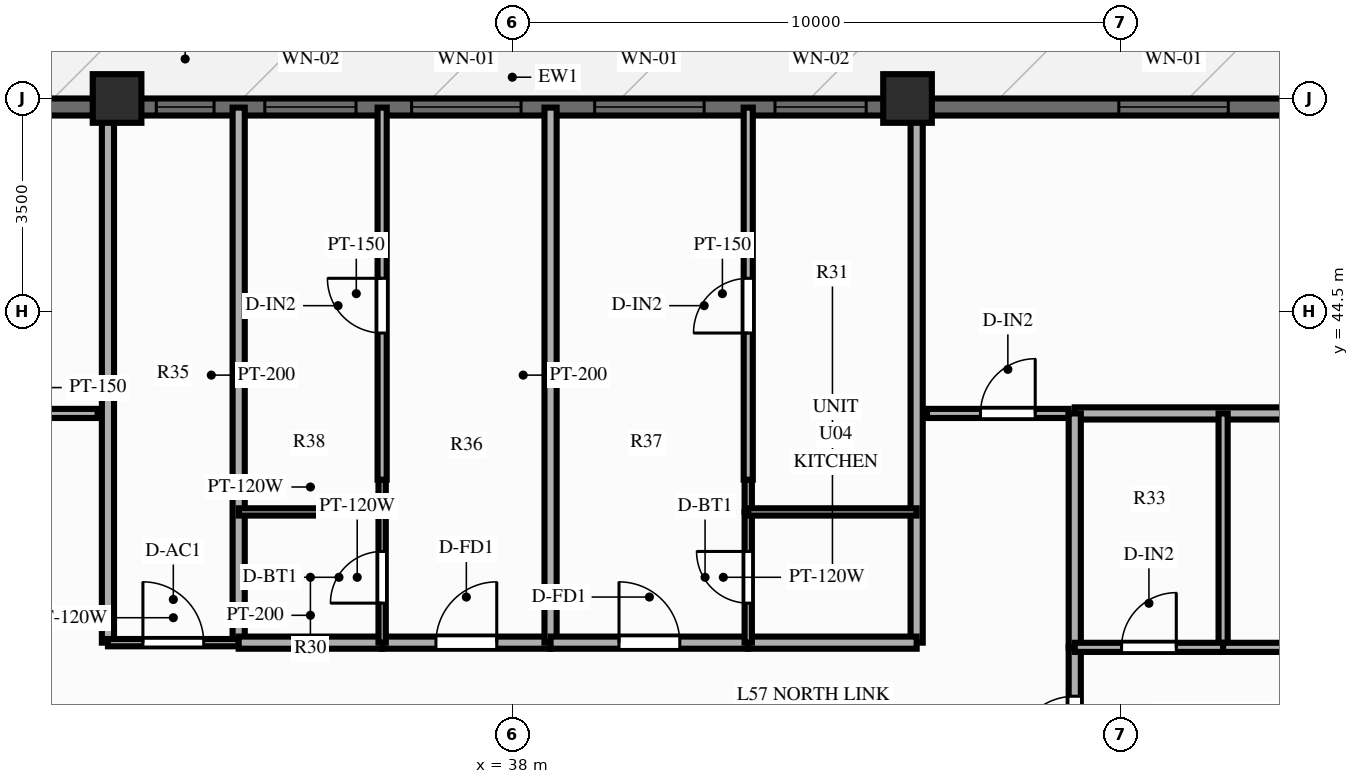
"""IFC4 building model, lengths in metres.
Left out: names, types, materials, properties, quantities, classifications, styles, units other than length and angle.
Written with IfcOpenShell. Run it as: python <this file> out.ifc"""

import sys

from ifc_helpers import new_model, si_unit, direction, frame, frame_2d, origin, origin_2d, place, context, subcontext, project, spatial, rectangle, extrude, source, transform, mapped, element, fill, save


model = new_model("IFC4")
c1 = context("Model", 3, precision=1e-05, world=origin(), true_north=direction((0.0, 1.0)))
c2 = subcontext(c1, "Body", "Model", "MODEL_VIEW")
j1 = project(units=[si_unit("LENGTHUNIT", "METRE"), si_unit("PLANEANGLEUNIT", "RADIAN")], contexts=[c1])
p1 = place(None, origin())
s1 = spatial("IfcSite", under=j1, at=p1, CompositionType="ELEMENT")
p2 = place(p1, origin())
s2 = spatial("IfcBuilding", under=s1, at=p2, CompositionType="ELEMENT")
p3 = place(p2, frame((0.0, 0.0, 182.8)))
s3 = spatial("IfcBuildingStorey", under=s2, at=p3, CompositionType="ELEMENT", Elevation=182.8)
m1 = source(origin(), c2, "Body", "SweptSolid", [
    extrude(rectangle(XDim=0.8, YDim=0.8, at=origin_2d()), origin(), (0.0, 0.0, 1.0), 3.9),
])
for number, where, z_axis, x_axis in (
    (1, (44.5, 48.0, 0.0), (0.0, 0.0, 1.0), (1.0, 0.0, 0.0)),
    (2, (31.5, 48.0, 0.0), (0.0, 0.0, 1.0), (1.0, 0.0, 0.0)),
):
    element("IfcColumn", number, at=place(p3, frame(where, z_axis=z_axis, x_axis=x_axis)), inside=s3, PredefinedType="COLUMN", context=c2, shape_type="MappedRepresentation", body=[
        mapped(m1, transform((0.0, 0.0, 0.0), scale=1.0)),
    ])
p4 = place(p3, frame((22.75, 47.86, 0.0), z_axis=(0.0, 0.0, 1.0), x_axis=(1.0, 0.0, 0.0)))
e3 = element("IfcWall", 3, at=p4, inside=s3, PredefinedType="SOLIDWALL", context=c2, shape_type="SweptSolid", body=[
    extrude(rectangle(XDim=30.5, YDim=0.28, at=frame_2d((15.25, 0.0))), origin(), (0.0, 0.0, 1.0), 2.79),
])
p5 = place(p4, frame((3.825, 0.0, 0.0)))
e4 = element("IfcOpeningElement", 4, at=p5, cuts=e3, PredefinedType="OPENING", context=c2, shape_type="SweptSolid", body=[
    extrude(rectangle(XDim=1.1, YDim=2.15, at=frame_2d((0.55, 1.075))), frame((0.0, 0.152, 0.0), z_axis=(0.0, -1.0, 0.0), x_axis=(1.0, 0.0, 0.0)), (0.0, 0.0, 1.0), 0.304),
])
p6 = place(p4, frame((9.395, 0.0, 0.85)))
e5 = element("IfcOpeningElement", 5, at=p6, cuts=e3, PredefinedType="OPENING", context=c2, shape_type="SweptSolid", body=[
    extrude(rectangle(XDim=0.95, YDim=1.5, at=frame_2d((0.475, 0.75))), frame((0.0, 0.152, 0.0), z_axis=(0.0, -1.0, 0.0), x_axis=(1.0, 0.0, 0.0)), (0.0, 0.0, 1.0), 0.304),
])
p7 = place(p4, frame((11.18, 0.0, 0.85)))
e6 = element("IfcOpeningElement", 6, at=p7, cuts=e3, PredefinedType="OPENING", context=c2, shape_type="SweptSolid", body=[
    extrude(rectangle(XDim=1.5, YDim=1.65, at=frame_2d((0.75, 0.825))), frame((0.0, 0.152, 0.0), z_axis=(0.0, -1.0, 0.0), x_axis=(1.0, 0.0, 0.0)), (0.0, 0.0, 1.0), 0.304),
])
p8 = place(p4, frame((13.594, 0.0, 0.85)))
e7 = element("IfcOpeningElement", 7, at=p8, cuts=e3, PredefinedType="OPENING", context=c2, shape_type="SweptSolid", body=[
    extrude(rectangle(XDim=1.8, YDim=1.65, at=frame_2d((0.9, 0.825))), frame((0.0, 0.152, 0.0), z_axis=(0.0, -1.0, 0.0), x_axis=(1.0, 0.0, 0.0)), (0.0, 0.0, 1.0), 0.304),
])
p9 = place(p4, frame((16.604, 0.0, 0.85)))
e8 = element("IfcOpeningElement", 8, at=p9, cuts=e3, PredefinedType="OPENING", context=c2, shape_type="SweptSolid", body=[
    extrude(rectangle(XDim=1.8, YDim=1.65, at=frame_2d((0.9, 0.825))), frame((0.0, 0.152, 0.0), z_axis=(0.0, -1.0, 0.0), x_axis=(1.0, 0.0, 0.0)), (0.0, 0.0, 1.0), 0.304),
])
p10 = place(p4, frame((19.57, 0.0, 0.85)))
e9 = element("IfcOpeningElement", 9, at=p10, cuts=e3, PredefinedType="OPENING", context=c2, shape_type="SweptSolid", body=[
    extrude(rectangle(XDim=1.5, YDim=1.65, at=frame_2d((0.75, 0.825))), frame((0.0, 0.152, 0.0), z_axis=(0.0, -1.0, 0.0), x_axis=(1.0, 0.0, 0.0)), (0.0, 0.0, 1.0), 0.304),
])
p11 = place(p4, frame((25.225, 0.0, 0.85)))
e10 = element("IfcOpeningElement", 10, at=p11, cuts=e3, PredefinedType="OPENING", context=c2, shape_type="SweptSolid", body=[
    extrude(rectangle(XDim=1.8, YDim=1.65, at=frame_2d((0.9, 0.825))), frame((0.0, 0.152, 0.0), z_axis=(0.0, -1.0, 0.0), x_axis=(1.0, 0.0, 0.0)), (0.0, 0.0, 1.0), 0.304),
])
p12 = place(p3, frame((28.85, 42.82, 0.0), z_axis=(0.0, 0.0, 1.0), x_axis=(1.0, 0.0, 0.0)))
e11 = element("IfcWall", 11, at=p12, inside=s3, PredefinedType="PARTITIONING", context=c2, shape_type="SweptSolid", body=[
    extrude(rectangle(XDim=2.33, YDim=0.15, at=frame_2d((1.165, 0.0))), origin(), (0.0, 0.0, 1.0), 3.69),
])
p13 = place(p12, frame((0.55, 0.0, 0.0)))
e12 = element("IfcOpeningElement", 12, at=p13, cuts=e11, PredefinedType="OPENING", context=c2, shape_type="SweptSolid", body=[
    extrude(rectangle(XDim=0.9, YDim=2.1, at=frame_2d((0.45, 1.05))), frame((0.0, 0.087, 0.0), z_axis=(0.0, -1.0, 0.0), x_axis=(1.0, 0.0, 0.0)), (0.0, 0.0, 1.0), 0.174),
])
p14 = place(p3, frame((44.82, 42.82, 0.0), z_axis=(0.0, 0.0, 1.0), x_axis=(1.0, 0.0, 0.0)))
e13 = element("IfcWall", 13, at=p14, inside=s3, PredefinedType="PARTITIONING", context=c2, shape_type="SweptSolid", body=[
    extrude(rectangle(XDim=2.33, YDim=0.15, at=frame_2d((1.165, 0.0))), origin(), (0.0, 0.0, 1.0), 3.69),
])
p15 = place(p14, frame((0.88, 0.0, 0.0)))
e14 = element("IfcOpeningElement", 14, at=p15, cuts=e13, PredefinedType="OPENING", context=c2, shape_type="SweptSolid", body=[
    extrude(rectangle(XDim=0.9, YDim=2.1, at=frame_2d((0.45, 1.05))), frame((0.0, 0.087, 0.0), z_axis=(0.0, -1.0, 0.0), x_axis=(1.0, 0.0, 0.0)), (0.0, 0.0, 1.0), 0.174),
])
for number, where, z_axis, x_axis in (
    (15, (31.35, 39.05, 0.0), (0.0, 0.0, 1.0), (0.0, 1.0, 0.0)),
    (16, (44.65, 39.05, 0.0), (0.0, 0.0, 1.0), (0.0, 1.0, 0.0)),
):
    element("IfcWall", number, at=place(p3, frame(where, z_axis=z_axis, x_axis=x_axis)), inside=s3, PredefinedType="PARTITIONING", context=c2, shape_type="SweptSolid", body=[
        extrude(rectangle(XDim=8.8, YDim=0.2, at=frame_2d((4.4, 0.0))), origin(), (0.0, 0.0, 1.0), 2.79),
    ])
p16 = place(p3, frame((33.5, 39.05, 0.0), z_axis=(0.0, 0.0, 1.0), x_axis=(0.0, 1.0, 0.0)))
e17 = element("IfcWall", 17, at=p16, inside=s3, PredefinedType="PARTITIONING", context=c2, shape_type="SweptSolid", body=[
    extrude(rectangle(XDim=8.8, YDim=0.2, at=frame_2d((4.4, 0.0))), origin(), (0.0, 0.0, 1.0), 3.69),
])
p17 = place(p3, frame((31.35, 39.05, 0.0), z_axis=(0.0, 0.0, 1.0), x_axis=(1.0, 0.0, 0.0)))
e18 = element("IfcWall", 18, at=p17, inside=s3, PredefinedType="PARTITIONING", context=c2, shape_type="SweptSolid", body=[
    extrude(rectangle(XDim=2.15, YDim=0.12, at=frame_2d((1.075, 0.0))), origin(), (0.0, 0.0, 1.0), 3.69),
])
p18 = place(p17, frame((0.575, 0.0, 0.0)))
e19 = element("IfcOpeningElement", 19, at=p18, cuts=e18, PredefinedType="OPENING", context=c2, shape_type="SweptSolid", body=[
    extrude(rectangle(XDim=1.0, YDim=2.1, at=frame_2d((0.5, 1.05))), frame((0.0, 0.072, 0.0), z_axis=(0.0, -1.0, 0.0), x_axis=(1.0, 0.0, 0.0)), (0.0, 0.0, 1.0), 0.144),
])
p19 = place(p3, frame((33.5, 39.05, 0.0), z_axis=(0.0, 0.0, 1.0), x_axis=(1.0, 0.0, 0.0)))
e20 = element("IfcWall", 20, at=p19, inside=s3, PredefinedType="PARTITIONING", context=c2, shape_type="SweptSolid", body=[
    extrude(rectangle(XDim=2.359, YDim=0.2, at=frame_2d((1.18, 0.0))), origin(), (0.0, 0.0, 1.0), 3.69),
])
p20 = place(p3, frame((35.859, 39.05, 0.0), z_axis=(0.0, 0.0, 1.0), x_axis=(1.0, 0.0, 0.0)))
e21 = element("IfcWall", 21, at=p20, inside=s3, PredefinedType="PARTITIONING", context=c2, shape_type="SweptSolid", body=[
    extrude(rectangle(XDim=2.77, YDim=0.2, at=frame_2d((1.385, 0.0))), origin(), (0.0, 0.0, 1.0), 3.69),
])
p21 = place(p20, frame((0.885, 0.0, 0.0)))
e22 = element("IfcOpeningElement", 22, at=p21, cuts=e21, PredefinedType="OPENING", context=c2, shape_type="SweptSolid", body=[
    extrude(rectangle(XDim=1.0, YDim=2.15, at=frame_2d((0.5, 1.075))), frame((0.0, 0.112, 0.0), z_axis=(0.0, -1.0, 0.0), x_axis=(1.0, 0.0, 0.0)), (0.0, 0.0, 1.0), 0.224),
])
p22 = place(p3, frame((35.859, 39.05, 0.0), z_axis=(0.0, 0.0, 1.0), x_axis=(0.0, 1.0, 0.0)))
e23 = element("IfcWall", 23, at=p22, inside=s3, PredefinedType="PARTITIONING", context=c2, shape_type="SweptSolid", body=[
    extrude(rectangle(XDim=2.15, YDim=0.12, at=frame_2d((1.075, 0.0))), origin(), (0.0, 0.0, 1.0), 3.69),
])
p23 = place(p22, frame((0.65, 0.0, 0.0)))
e24 = element("IfcOpeningElement", 24, at=p23, cuts=e23, PredefinedType="OPENING", context=c2, shape_type="SweptSolid", body=[
    extrude(rectangle(XDim=0.85, YDim=2.05, at=frame_2d((0.425, 1.025))), frame((0.0, 0.072, 0.0), z_axis=(0.0, -1.0, 0.0), x_axis=(1.0, 0.0, 0.0)), (0.0, 0.0, 1.0), 0.144),
])
p24 = place(p3, frame((35.859, 41.2, 0.0), z_axis=(0.0, 0.0, 1.0), x_axis=(0.0, 1.0, 0.0)))
e25 = element("IfcWall", 25, at=p24, inside=s3, PredefinedType="PARTITIONING", context=c2, shape_type="SweptSolid", body=[
    extrude(rectangle(XDim=0.53, YDim=0.12, at=frame_2d((0.265, 0.0))), origin(), (0.0, 0.0, 1.0), 3.69),
])
p25 = place(p3, frame((33.5, 41.2, 0.0), z_axis=(0.0, 0.0, 1.0), x_axis=(1.0, 0.0, 0.0)))
e26 = element("IfcWall", 26, at=p25, inside=s3, PredefinedType="PARTITIONING", context=c2, shape_type="SweptSolid", body=[
    extrude(rectangle(XDim=2.359, YDim=0.12, at=frame_2d((1.18, 0.0))), origin(), (0.0, 0.0, 1.0), 3.69),
])
p26 = place(p3, frame((35.859, 41.73, 0.0), z_axis=(0.0, 0.0, 1.0), x_axis=(0.0, 1.0, 0.0)))
e27 = element("IfcWall", 27, at=p26, inside=s3, PredefinedType="PARTITIONING", context=c2, shape_type="SweptSolid", body=[
    extrude(rectangle(XDim=6.12, YDim=0.15, at=frame_2d((3.06, 0.0))), origin(), (0.0, 0.0, 1.0), 3.69),
])
p27 = place(p26, frame((2.413, 0.0, 0.0)))
e28 = element("IfcOpeningElement", 28, at=p27, cuts=e27, PredefinedType="OPENING", context=c2, shape_type="SweptSolid", body=[
    extrude(rectangle(XDim=0.9, YDim=2.1, at=frame_2d((0.45, 1.05))), frame((0.0, 0.087, 0.0), z_axis=(0.0, -1.0, 0.0), x_axis=(1.0, 0.0, 0.0)), (0.0, 0.0, 1.0), 0.174),
])
p28 = place(p3, frame((38.629, 39.05, 0.0), z_axis=(0.0, 0.0, 1.0), x_axis=(0.0, 1.0, 0.0)))
e29 = element("IfcWall", 29, at=p28, inside=s3, PredefinedType="PARTITIONING", context=c2, shape_type="SweptSolid", body=[
    extrude(rectangle(XDim=8.8, YDim=0.2, at=frame_2d((4.4, 0.0))), origin(), (0.0, 0.0, 1.0), 3.69),
])
p29 = place(p3, frame((38.629, 39.05, 0.0), z_axis=(0.0, 0.0, 1.0), x_axis=(1.0, 0.0, 0.0)))
e30 = element("IfcWall", 30, at=p29, inside=s3, PredefinedType="PARTITIONING", context=c2, shape_type="SweptSolid", body=[
    extrude(rectangle(XDim=3.251, YDim=0.2, at=frame_2d((1.626, 0.0))), origin(), (0.0, 0.0, 1.0), 3.69),
])
p30 = place(p29, frame((1.126, 0.0, 0.0)))
e31 = element("IfcOpeningElement", 31, at=p30, cuts=e30, PredefinedType="OPENING", context=c2, shape_type="SweptSolid", body=[
    extrude(rectangle(XDim=1.0, YDim=2.15, at=frame_2d((0.5, 1.075))), frame((0.0, 0.112, 0.0), z_axis=(0.0, -1.0, 0.0), x_axis=(1.0, 0.0, 0.0)), (0.0, 0.0, 1.0), 0.224),
])
p31 = place(p3, frame((41.88, 39.05, 0.0), z_axis=(0.0, 0.0, 1.0), x_axis=(1.0, 0.0, 0.0)))
e32 = element("IfcWall", 32, at=p31, inside=s3, PredefinedType="PARTITIONING", context=c2, shape_type="SweptSolid", body=[
    extrude(rectangle(XDim=2.77, YDim=0.2, at=frame_2d((1.385, 0.0))), origin(), (0.0, 0.0, 1.0), 3.69),
])
p32 = place(p3, frame((41.88, 39.05, 0.0), z_axis=(0.0, 0.0, 1.0), x_axis=(0.0, 1.0, 0.0)))
e33 = element("IfcWall", 33, at=p32, inside=s3, PredefinedType="PARTITIONING", context=c2, shape_type="SweptSolid", body=[
    extrude(rectangle(XDim=2.15, YDim=0.12, at=frame_2d((1.075, 0.0))), origin(), (0.0, 0.0, 1.0), 3.69),
])
p33 = place(p32, frame((0.65, 0.0, 0.0)))
e34 = element("IfcOpeningElement", 34, at=p33, cuts=e33, PredefinedType="OPENING", context=c2, shape_type="SweptSolid", body=[
    extrude(rectangle(XDim=0.85, YDim=2.05, at=frame_2d((0.425, 1.025))), frame((0.0, 0.072, 0.0), z_axis=(0.0, -1.0, 0.0), x_axis=(1.0, 0.0, 0.0)), (0.0, 0.0, 1.0), 0.144),
])
p34 = place(p3, frame((41.88, 41.2, 0.0), z_axis=(0.0, 0.0, 1.0), x_axis=(0.0, 1.0, 0.0)))
e35 = element("IfcWall", 35, at=p34, inside=s3, PredefinedType="PARTITIONING", context=c2, shape_type="SweptSolid", body=[
    extrude(rectangle(XDim=0.53, YDim=0.12, at=frame_2d((0.265, 0.0))), origin(), (0.0, 0.0, 1.0), 3.69),
])
p35 = place(p3, frame((41.88, 41.2, 0.0), z_axis=(0.0, 0.0, 1.0), x_axis=(1.0, 0.0, 0.0)))
e36 = element("IfcWall", 36, at=p35, inside=s3, PredefinedType="PARTITIONING", context=c2, shape_type="SweptSolid", body=[
    extrude(rectangle(XDim=2.77, YDim=0.12, at=frame_2d((1.385, 0.0))), origin(), (0.0, 0.0, 1.0), 3.69),
])
p36 = place(p3, frame((41.88, 41.73, 0.0), z_axis=(0.0, 0.0, 1.0), x_axis=(0.0, 1.0, 0.0)))
e37 = element("IfcWall", 37, at=p36, inside=s3, PredefinedType="PARTITIONING", context=c2, shape_type="SweptSolid", body=[
    extrude(rectangle(XDim=6.12, YDim=0.15, at=frame_2d((3.06, 0.0))), origin(), (0.0, 0.0, 1.0), 3.69),
])
p37 = place(p36, frame((2.413, 0.0, 0.0)))
e38 = element("IfcOpeningElement", 38, at=p37, cuts=e37, PredefinedType="OPENING", context=c2, shape_type="SweptSolid", body=[
    extrude(rectangle(XDim=0.9, YDim=2.1, at=frame_2d((0.45, 1.05))), frame((0.0, 0.087, 0.0), z_axis=(0.0, -1.0, 0.0), x_axis=(1.0, 0.0, 0.0)), (0.0, 0.0, 1.0), 0.174),
])
p38 = place(p3, frame((47.25, 42.82, 0.0), z_axis=(0.0, 0.0, 1.0), x_axis=(1.0, 0.0, 0.0)))
e39 = element("IfcWall", 39, at=p38, inside=s3, PredefinedType="PARTITIONING", context=c2, shape_type="SweptSolid", body=[
    extrude(rectangle(XDim=10.85, YDim=0.2, at=frame_2d((5.425, 0.0))), origin(), (0.0, 0.0, 1.0), 3.69),
])
p39 = place(p3, frame((47.25, 35.445, 0.0), z_axis=(0.0, 0.0, 1.0), x_axis=(0.0, 1.0, 0.0)))
e40 = element("IfcWall", 40, at=p39, inside=s3, PredefinedType="PARTITIONING", context=c2, shape_type="SweptSolid", body=[
    extrude(rectangle(XDim=3.527, YDim=0.2, at=frame_2d((1.764, 0.0))), origin(), (0.0, 0.0, 1.0), 3.69),
])
p40 = place(p39, frame((1.724, 0.0, 0.0)))
e41 = element("IfcOpeningElement", 41, at=p40, cuts=e40, PredefinedType="OPENING", context=c2, shape_type="SweptSolid", body=[
    extrude(rectangle(XDim=1.0, YDim=2.15, at=frame_2d((0.5, 1.075))), frame((0.0, 0.112, 0.0), z_axis=(0.0, -1.0, 0.0), x_axis=(1.0, 0.0, 0.0)), (0.0, 0.0, 1.0), 0.224),
])
p41 = place(p3, frame((47.25, 38.973, 0.0), z_axis=(0.0, 0.0, 1.0), x_axis=(0.0, 1.0, 0.0)))
e42 = element("IfcWall", 42, at=p41, inside=s3, PredefinedType="PARTITIONING", context=c2, shape_type="SweptSolid", body=[
    extrude(rectangle(XDim=3.847, YDim=0.2, at=frame_2d((1.924, 0.0))), origin(), (0.0, 0.0, 1.0), 3.69),
])
p42 = place(p3, frame((49.69, 38.973, 0.0), z_axis=(0.0, 0.0, 1.0), x_axis=(0.0, 1.0, 0.0)))
e43 = element("IfcWall", 43, at=p42, inside=s3, PredefinedType="PARTITIONING", context=c2, shape_type="SweptSolid", body=[
    extrude(rectangle(XDim=3.847, YDim=0.15, at=frame_2d((1.924, 0.0))), origin(), (0.0, 0.0, 1.0), 3.69),
])
p43 = place(p3, frame((47.25, 38.973, 0.0), z_axis=(0.0, 0.0, 1.0), x_axis=(1.0, 0.0, 0.0)))
e44 = element("IfcWall", 44, at=p43, inside=s3, PredefinedType="PARTITIONING", context=c2, shape_type="SweptSolid", body=[
    extrude(rectangle(XDim=2.44, YDim=0.15, at=frame_2d((1.22, 0.0))), origin(), (0.0, 0.0, 1.0), 3.69),
])
p44 = place(p43, frame((0.77, 0.0, 0.0)))
e45 = element("IfcOpeningElement", 45, at=p44, cuts=e44, PredefinedType="OPENING", context=c2, shape_type="SweptSolid", body=[
    extrude(rectangle(XDim=0.9, YDim=2.1, at=frame_2d((0.45, 1.05))), frame((0.0, 0.087, 0.0), z_axis=(0.0, -1.0, 0.0), x_axis=(1.0, 0.0, 0.0)), (0.0, 0.0, 1.0), 0.174),
])
p45 = place(p3, frame((49.69, 38.973, 0.0), z_axis=(0.0, 0.0, 1.0), x_axis=(1.0, 0.0, 0.0)))
e46 = element("IfcWall", 46, at=p45, inside=s3, PredefinedType="PARTITIONING", context=c2, shape_type="SweptSolid", body=[
    extrude(rectangle(XDim=8.41, YDim=0.15, at=frame_2d((4.205, 0.0))), origin(), (0.0, 0.0, 1.0), 3.69),
])
p46 = place(p45, frame((3.462, 0.0, 0.0)))
e47 = element("IfcOpeningElement", 47, at=p46, cuts=e46, PredefinedType="OPENING", context=c2, shape_type="SweptSolid", body=[
    extrude(rectangle(XDim=0.9, YDim=2.1, at=frame_2d((0.45, 1.05))), frame((0.0, 0.087, 0.0), z_axis=(0.0, -1.0, 0.0), x_axis=(1.0, 0.0, 0.0)), (0.0, 0.0, 1.0), 0.174),
])
m2 = source(origin(), c2, "Body", "SweptSolid", [
    extrude(rectangle(XDim=0.95, YDim=1.5, at=frame_2d((0.475, 0.75))), frame((0.0, 0.03, 0.0), z_axis=(0.0, -1.0, 0.0), x_axis=(1.0, 0.0, 0.0)), (0.0, 0.0, 1.0), 0.06),
])
p47 = place(p6, origin())
e48 = element("IfcWindow", 48, at=p47, inside=s3, PartitioningType="SINGLE_PANEL", PredefinedType="WINDOW", context=c2, shape_type="MappedRepresentation", body=[
    mapped(m2, transform((0.0, 0.0, 0.0), scale=1.0)),
])
fill(e5, e48)
m3 = source(origin(), c2, "Body", "SweptSolid", [
    extrude(rectangle(XDim=1.5, YDim=1.65, at=frame_2d((0.75, 0.825))), frame((0.0, 0.03, 0.0), z_axis=(0.0, -1.0, 0.0), x_axis=(1.0, 0.0, 0.0)), (0.0, 0.0, 1.0), 0.06),
])
p48 = place(p7, origin())
e49 = element("IfcWindow", 49, at=p48, inside=s3, PartitioningType="SINGLE_PANEL", PredefinedType="WINDOW", context=c2, shape_type="MappedRepresentation", body=[
    mapped(m3, transform((0.0, 0.0, 0.0), scale=1.0)),
])
fill(e6, e49)
m4 = source(origin(), c2, "Body", "SweptSolid", [
    extrude(rectangle(XDim=1.8, YDim=1.65, at=frame_2d((0.9, 0.825))), frame((0.0, 0.03, 0.0), z_axis=(0.0, -1.0, 0.0), x_axis=(1.0, 0.0, 0.0)), (0.0, 0.0, 1.0), 0.06),
])
p49 = place(p8, origin())
e50 = element("IfcWindow", 50, at=p49, inside=s3, PartitioningType="SINGLE_PANEL", PredefinedType="WINDOW", context=c2, shape_type="MappedRepresentation", body=[
    mapped(m4, transform((0.0, 0.0, 0.0), scale=1.0)),
])
fill(e7, e50)
p50 = place(p9, origin())
e51 = element("IfcWindow", 51, at=p50, inside=s3, PartitioningType="SINGLE_PANEL", PredefinedType="WINDOW", context=c2, shape_type="MappedRepresentation", body=[
    mapped(m4, transform((0.0, 0.0, 0.0), scale=1.0)),
])
fill(e8, e51)
p51 = place(p10, origin())
e52 = element("IfcWindow", 52, at=p51, inside=s3, PartitioningType="SINGLE_PANEL", PredefinedType="WINDOW", context=c2, shape_type="MappedRepresentation", body=[
    mapped(m3, transform((0.0, 0.0, 0.0), scale=1.0)),
])
fill(e9, e52)
p52 = place(p11, origin())
e53 = element("IfcWindow", 53, at=p52, inside=s3, PartitioningType="SINGLE_PANEL", PredefinedType="WINDOW", context=c2, shape_type="MappedRepresentation", body=[
    mapped(m4, transform((0.0, 0.0, 0.0), scale=1.0)),
])
fill(e10, e53)
m5 = source(origin(), c2, "Body", "SweptSolid", [
    extrude(rectangle(XDim=0.9, YDim=2.1, at=frame_2d((0.45, 1.05))), frame((0.0, 0.025, 0.0), z_axis=(0.0, -1.0, 0.0), x_axis=(1.0, 0.0, 0.0)), (0.0, 0.0, 1.0), 0.05),
])
p53 = place(p15, origin())
e54 = element("IfcDoor", 54, at=p53, inside=s3, OperationType="SINGLE_SWING_RIGHT", PredefinedType="DOOR", context=c2, shape_type="MappedRepresentation", body=[
    mapped(m5, transform((0.0, 0.0, 0.0), scale=1.0)),
])
fill(e14, e54)
m6 = source(origin(), c2, "Body", "SweptSolid", [
    extrude(rectangle(XDim=1.0, YDim=2.1, at=frame_2d((0.5, 1.05))), frame((0.0, 0.025, 0.0), z_axis=(0.0, -1.0, 0.0), x_axis=(1.0, 0.0, 0.0)), (0.0, 0.0, 1.0), 0.05),
])
p54 = place(p18, origin())
e55 = element("IfcDoor", 55, at=p54, inside=s3, OperationType="SINGLE_SWING_LEFT", PredefinedType="DOOR", context=c2, shape_type="MappedRepresentation", body=[
    mapped(m6, transform((0.0, 0.0, 0.0), scale=1.0)),
])
fill(e19, e55)
m7 = source(origin(), c2, "Body", "SweptSolid", [
    extrude(rectangle(XDim=1.0, YDim=2.15, at=frame_2d((0.5, 1.075))), frame((0.0, 0.025, 0.0), z_axis=(0.0, -1.0, 0.0), x_axis=(1.0, 0.0, 0.0)), (0.0, 0.0, 1.0), 0.05),
])
p55 = place(p21, origin())
e56 = element("IfcDoor", 56, at=p55, inside=s3, OperationType="SINGLE_SWING_RIGHT", PredefinedType="DOOR", context=c2, shape_type="MappedRepresentation", body=[
    mapped(m7, transform((0.0, 0.0, 0.0), scale=1.0)),
])
fill(e22, e56)
m8 = source(origin(), c2, "Body", "SweptSolid", [
    extrude(rectangle(XDim=0.85, YDim=2.05, at=frame_2d((0.425, 1.025))), frame((0.0, 0.025, 0.0), z_axis=(0.0, -1.0, 0.0), x_axis=(1.0, 0.0, 0.0)), (0.0, 0.0, 1.0), 0.05),
])
p56 = place(p23, origin())
e57 = element("IfcDoor", 57, at=p56, inside=s3, OperationType="SINGLE_SWING_LEFT", PredefinedType="DOOR", context=c2, shape_type="MappedRepresentation", body=[
    mapped(m8, transform((0.0, 0.0, 0.0), scale=1.0)),
])
fill(e24, e57)
p57 = place(p27, origin())
e58 = element("IfcDoor", 58, at=p57, inside=s3, OperationType="SINGLE_SWING_RIGHT", PredefinedType="DOOR", context=c2, shape_type="MappedRepresentation", body=[
    mapped(m5, transform((0.0, 0.0, 0.0), scale=1.0)),
])
fill(e28, e58)
p58 = place(p30, origin())
e59 = element("IfcDoor", 59, at=p58, inside=s3, OperationType="SINGLE_SWING_LEFT", PredefinedType="DOOR", context=c2, shape_type="MappedRepresentation", body=[
    mapped(m7, transform((0.0, 0.0, 0.0), scale=1.0)),
])
fill(e31, e59)
p59 = place(p33, origin())
e60 = element("IfcDoor", 60, at=p59, inside=s3, OperationType="SINGLE_SWING_RIGHT", PredefinedType="DOOR", context=c2, shape_type="MappedRepresentation", body=[
    mapped(m8, transform((0.0, 0.0, 0.0), scale=1.0)),
])
fill(e34, e60)
p60 = place(p37, origin())
e61 = element("IfcDoor", 61, at=p60, inside=s3, OperationType="SINGLE_SWING_LEFT", PredefinedType="DOOR", context=c2, shape_type="MappedRepresentation", body=[
    mapped(m5, transform((0.0, 0.0, 0.0), scale=1.0)),
])
fill(e38, e61)
p61 = place(p40, origin())
e62 = element("IfcDoor", 62, at=p61, inside=s3, OperationType="SINGLE_SWING_LEFT", PredefinedType="DOOR", context=c2, shape_type="MappedRepresentation", body=[
    mapped(m7, transform((0.0, 0.0, 0.0), scale=1.0)),
])
fill(e41, e62)
p62 = place(p44, origin())
e63 = element("IfcDoor", 63, at=p62, inside=s3, OperationType="SINGLE_SWING_RIGHT", PredefinedType="DOOR", context=c2, shape_type="MappedRepresentation", body=[
    mapped(m5, transform((0.0, 0.0, 0.0), scale=1.0)),
])
fill(e45, e63)
save(model, sys.argv[1])
